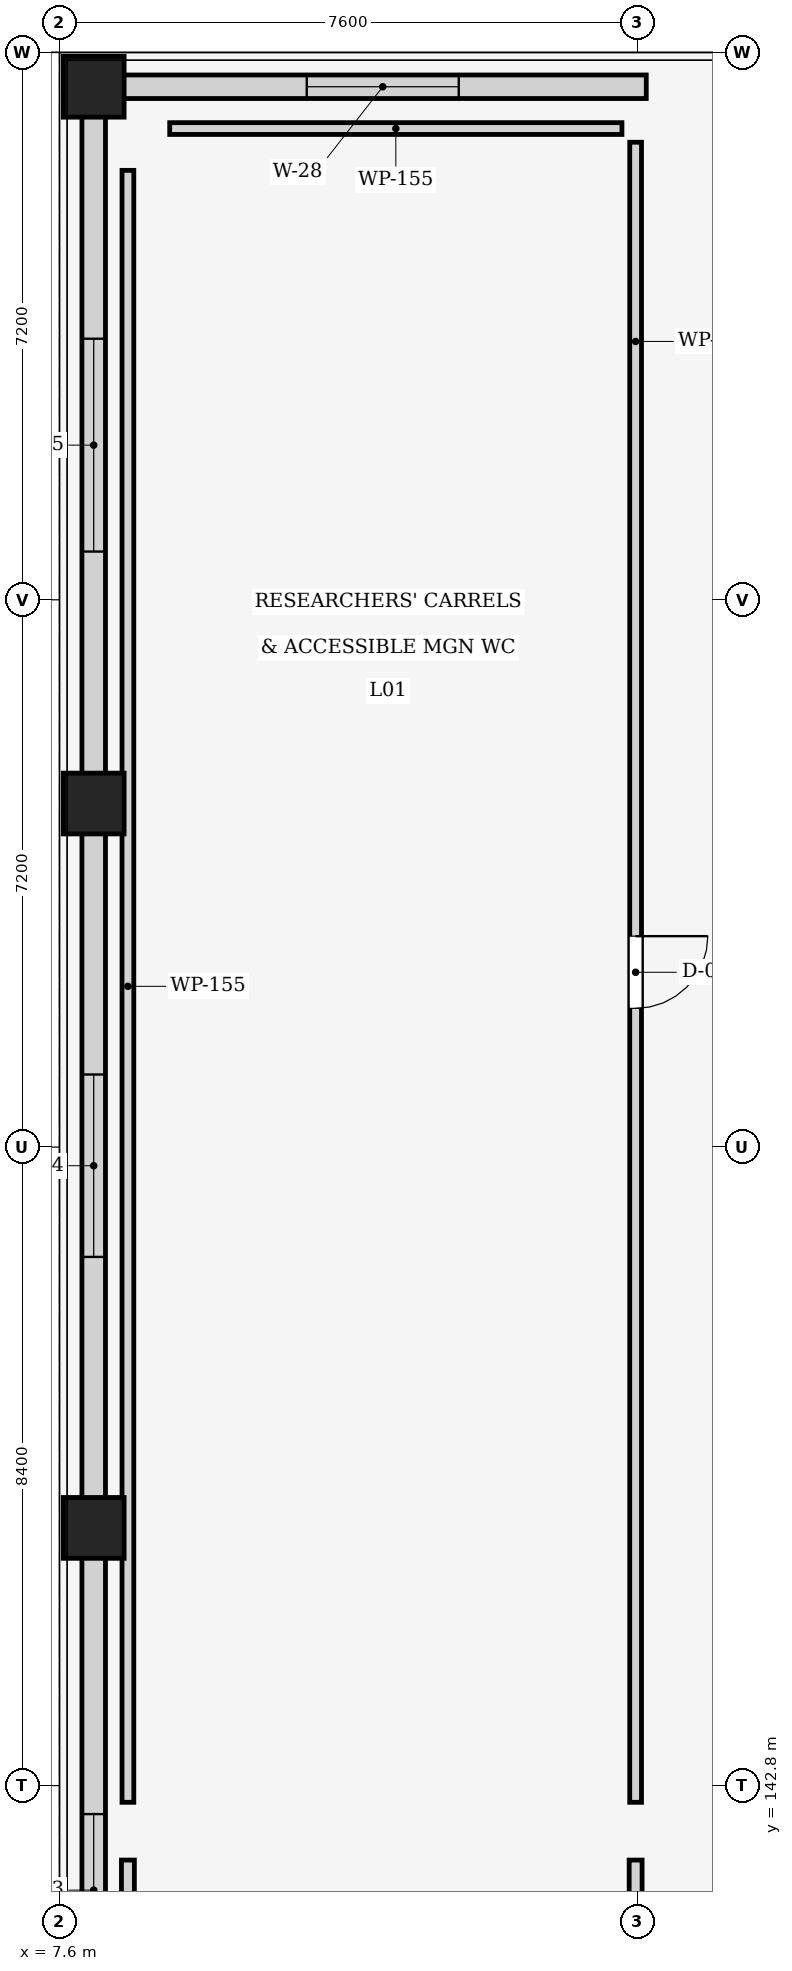
"""IFC4 building model, lengths in metres.
Left out: names, types, materials, properties, quantities, classifications, styles, units other than length and angle.
Written with IfcOpenShell. Run it as: python <this file> out.ifc"""

import sys

from ifc_helpers import new_model, si_unit, direction, frame, frame_2d, origin, origin_2d, place, context, subcontext, project, spatial, rectangle, extrude, element, fill, save


model = new_model("IFC4")
c1 = context("Model", 3, precision=1e-05, world=origin(), true_north=direction((0.0, 1.0)))
c2 = subcontext(c1, "Body", "Model", "MODEL_VIEW")
j1 = project(units=[si_unit("LENGTHUNIT", "METRE"), si_unit("PLANEANGLEUNIT", "RADIAN")], contexts=[c1])
p1 = place(None, origin())
s1 = spatial("IfcSite", under=j1, at=p1, CompositionType="ELEMENT")
p2 = place(p1, origin())
s2 = spatial("IfcBuilding", under=s1, at=p2, CompositionType="ELEMENT")
p3 = place(p2, frame((0.0, 0.0, 5.1)))
s3 = spatial("IfcBuildingStorey", under=s2, at=p3, CompositionType="ELEMENT", Elevation=5.1)
for number, where, z_axis, x_axis in (
    (1, (8.05, 146.19, 0.0), (0.0, 0.0, 1.0), (1.0, 0.0, 0.0)),
    (2, (8.05, 155.72, 0.0), (0.0, 0.0, 1.0), (1.0, 0.0, 0.0)),
    (3, (8.05, 165.15, 0.0), (0.0, 0.0, 1.0), (1.0, 0.0, 0.0)),
):
    element("IfcColumn", number, at=place(p3, frame(where, z_axis=z_axis, x_axis=x_axis)), inside=s3, PredefinedType="COLUMN", context=c2, shape_type="SweptSolid", body=[
        extrude(rectangle(XDim=0.8, YDim=0.8, at=origin_2d()), origin(), (0.0, 0.0, 1.0), 4.05),
    ])
p4 = place(p3, frame((8.385, 165.15, 0.0), z_axis=(0.0, 0.0, 1.0), x_axis=(1.0, 0.0, 0.0)))
e4 = element("IfcWall", 4, at=p4, inside=s3, PredefinedType="STANDARD", context=c2, shape_type="SweptSolid", body=[
    extrude(rectangle(XDim=6.935, YDim=0.31, at=frame_2d((3.468, 0.0))), origin(), (0.0, 0.0, 1.0), 2.995),
])
p5 = place(p4, frame((2.468, 0.0, 0.85)))
e5 = element("IfcOpeningElement", 5, at=p5, cuts=e4, PredefinedType="OPENING", context=c2, shape_type="SweptSolid", body=[
    extrude(rectangle(XDim=2.0, YDim=1.85, at=frame_2d((1.0, 0.925))), frame((0.0, 0.165, 0.0), z_axis=(0.0, -1.0, 0.0), x_axis=(1.0, 0.0, 0.0)), (0.0, 0.0, 1.0), 0.33),
])
p6 = place(p3, frame((8.05, 136.995, 0.0), z_axis=(0.0, 0.0, 1.0), x_axis=(0.0, 1.0, 0.0)))
e6 = element("IfcWall", 6, at=p6, inside=s3, PredefinedType="STANDARD", context=c2, shape_type="SweptSolid", body=[
    extrude(rectangle(XDim=8.86, YDim=0.31, at=frame_2d((4.43, 0.0))), origin(), (0.0, 0.0, 1.0), 3.145),
])
p7 = place(p6, frame((3.43, 0.0, 0.85)))
e7 = element("IfcOpeningElement", 7, at=p7, cuts=e6, PredefinedType="OPENING", context=c2, shape_type="SweptSolid", body=[
    extrude(rectangle(XDim=2.0, YDim=2.05, at=frame_2d((1.0, 1.025))), frame((0.0, 0.165, 0.0), z_axis=(0.0, -1.0, 0.0), x_axis=(1.0, 0.0, 0.0)), (0.0, 0.0, 1.0), 0.33),
])
p8 = place(p3, frame((8.05, 146.525, 0.0), z_axis=(0.0, 0.0, 1.0), x_axis=(0.0, 1.0, 0.0)))
e8 = element("IfcWall", 8, at=p8, inside=s3, PredefinedType="STANDARD", context=c2, shape_type="SweptSolid", body=[
    extrude(rectangle(XDim=8.86, YDim=0.31, at=frame_2d((4.43, 0.0))), origin(), (0.0, 0.0, 1.0), 3.145),
])
p9 = place(p8, frame((3.23, 0.0, 0.85)))
e9 = element("IfcOpeningElement", 9, at=p9, cuts=e8, PredefinedType="OPENING", context=c2, shape_type="SweptSolid", body=[
    extrude(rectangle(XDim=2.4, YDim=2.05, at=frame_2d((1.2, 1.025))), frame((0.0, 0.165, 0.0), z_axis=(0.0, -1.0, 0.0), x_axis=(1.0, 0.0, 0.0)), (0.0, 0.0, 1.0), 0.33),
])
p10 = place(p3, frame((8.05, 156.055, 0.0), z_axis=(0.0, 0.0, 1.0), x_axis=(0.0, 1.0, 0.0)))
e10 = element("IfcWall", 10, at=p10, inside=s3, PredefinedType="STANDARD", context=c2, shape_type="SweptSolid", body=[
    extrude(rectangle(XDim=8.76, YDim=0.31, at=frame_2d((4.38, 0.0))), origin(), (0.0, 0.0, 1.0), 3.145),
])
p11 = place(p10, frame((2.98, 0.0, 0.85)))
e11 = element("IfcOpeningElement", 11, at=p11, cuts=e10, PredefinedType="OPENING", context=c2, shape_type="SweptSolid", body=[
    extrude(rectangle(XDim=2.8, YDim=2.05, at=frame_2d((1.4, 1.025))), frame((0.0, 0.165, 0.0), z_axis=(0.0, -1.0, 0.0), x_axis=(1.0, 0.0, 0.0)), (0.0, 0.0, 1.0), 0.33),
])
p12 = place(p3, frame((15.18, 141.82, 0.0), z_axis=(0.0, 0.0, 1.0), x_axis=(0.0, -1.0, 0.0)))
e12 = element("IfcWall", 12, at=p12, inside=s3, PredefinedType="PARTITIONING", context=c2, shape_type="SweptSolid", body=[
    extrude(rectangle(XDim=23.44, YDim=0.17, at=frame_2d((11.72, 0.0))), origin(), (0.0, 0.0, 1.0), 2.995),
])
p13 = place(p12, frame((11.27, 0.0, 0.0)))
e13 = element("IfcOpeningElement", 13, at=p13, cuts=e12, PredefinedType="OPENING", context=c2, shape_type="SweptSolid", body=[
    extrude(rectangle(XDim=0.9, YDim=2.1, at=frame_2d((0.45, 1.05))), frame((0.0, 0.095, 0.0), z_axis=(0.0, -1.0, 0.0), x_axis=(1.0, 0.0, 0.0)), (0.0, 0.0, 1.0), 0.19),
])
p14 = place(p3, frame((8.5, 118.75, 0.0), z_axis=(0.0, 0.0, 1.0), x_axis=(0.0, 1.0, 0.0)))
e14 = element("IfcWall", 14, at=p14, inside=s3, PredefinedType="PARTITIONING", context=c2, shape_type="SweptSolid", body=[
    extrude(rectangle(XDim=23.07, YDim=0.17, at=frame_2d((11.535, 0.0))), origin(), (0.0, 0.0, 1.0), 2.995),
])
p15 = place(p3, frame((15.18, 164.42, 0.0), z_axis=(0.0, 0.0, 1.0), x_axis=(0.0, -1.0, 0.0)))
e15 = element("IfcWall", 15, at=p15, inside=s3, PredefinedType="PARTITIONING", context=c2, shape_type="SweptSolid", body=[
    extrude(rectangle(XDim=21.84, YDim=0.155, at=frame_2d((10.92, 0.0))), origin(), (0.0, 0.0, 1.0), 2.995),
])
p16 = place(p15, frame((10.445, 0.0, 0.0)))
e16 = element("IfcOpeningElement", 16, at=p16, cuts=e15, PredefinedType="OPENING", context=c2, shape_type="SweptSolid", body=[
    extrude(rectangle(XDim=0.95, YDim=2.1, at=frame_2d((0.475, 1.05))), frame((0.0, 0.087, 0.0), z_axis=(0.0, -1.0, 0.0), x_axis=(1.0, 0.0, 0.0)), (0.0, 0.0, 1.0), 0.175),
])
p17 = place(p3, frame((8.5, 142.58, 0.0), z_axis=(0.0, 0.0, 1.0), x_axis=(0.0, 1.0, 0.0)))
e17 = element("IfcWall", 17, at=p17, inside=s3, PredefinedType="PARTITIONING", context=c2, shape_type="SweptSolid", body=[
    extrude(rectangle(XDim=21.47, YDim=0.155, at=frame_2d((10.735, 0.0))), origin(), (0.0, 0.0, 1.0), 2.995),
])
p18 = place(p3, frame((9.05, 164.6, 0.0), z_axis=(0.0, 0.0, 1.0), x_axis=(1.0, 0.0, 0.0)))
e18 = element("IfcWall", 18, at=p18, inside=s3, PredefinedType="PARTITIONING", context=c2, shape_type="SweptSolid", body=[
    extrude(rectangle(XDim=5.95, YDim=0.155, at=frame_2d((2.975, 0.0))), origin(), (0.0, 0.0, 1.0), 3.68),
])
p19 = place(p5, origin())
e19 = element("IfcWindow", 19, at=p19, inside=s3, PartitioningType="SINGLE_PANEL", PredefinedType="WINDOW", context=c2, shape_type="SweptSolid", body=[
    extrude(rectangle(XDim=2.0, YDim=1.85, at=frame_2d((1.0, 0.925))), frame((0.0, 0.03, 0.0), z_axis=(0.0, -1.0, 0.0), x_axis=(1.0, 0.0, 0.0)), (0.0, 0.0, 1.0), 0.06),
])
fill(e5, e19)
p20 = place(p7, origin())
e20 = element("IfcWindow", 20, at=p20, inside=s3, PartitioningType="SINGLE_PANEL", PredefinedType="WINDOW", context=c2, shape_type="SweptSolid", body=[
    extrude(rectangle(XDim=2.0, YDim=2.05, at=frame_2d((1.0, 1.025))), frame((0.0, 0.03, 0.0), z_axis=(0.0, -1.0, 0.0), x_axis=(1.0, 0.0, 0.0)), (0.0, 0.0, 1.0), 0.06),
])
fill(e7, e20)
p21 = place(p9, origin())
e21 = element("IfcWindow", 21, at=p21, inside=s3, PartitioningType="SINGLE_PANEL", PredefinedType="WINDOW", context=c2, shape_type="SweptSolid", body=[
    extrude(rectangle(XDim=2.4, YDim=2.05, at=frame_2d((1.2, 1.025))), frame((0.0, 0.03, 0.0), z_axis=(0.0, -1.0, 0.0), x_axis=(1.0, 0.0, 0.0)), (0.0, 0.0, 1.0), 0.06),
])
fill(e9, e21)
p22 = place(p11, origin())
e22 = element("IfcWindow", 22, at=p22, inside=s3, PartitioningType="SINGLE_PANEL", PredefinedType="WINDOW", context=c2, shape_type="SweptSolid", body=[
    extrude(rectangle(XDim=2.8, YDim=2.05, at=frame_2d((1.4, 1.025))), frame((0.0, 0.03, 0.0), z_axis=(0.0, -1.0, 0.0), x_axis=(1.0, 0.0, 0.0)), (0.0, 0.0, 1.0), 0.06),
])
fill(e11, e22)
p23 = place(p16, origin())
e23 = element("IfcDoor", 23, at=p23, inside=s3, OperationType="SINGLE_SWING_LEFT", PredefinedType="DOOR", context=c2, shape_type="SweptSolid", body=[
    extrude(rectangle(XDim=0.95, YDim=2.1, at=frame_2d((0.475, 1.05))), frame((0.0, 0.025, 0.0), z_axis=(0.0, -1.0, 0.0), x_axis=(1.0, 0.0, 0.0)), (0.0, 0.0, 1.0), 0.05),
])
fill(e16, e23)
save(model, sys.argv[1])
